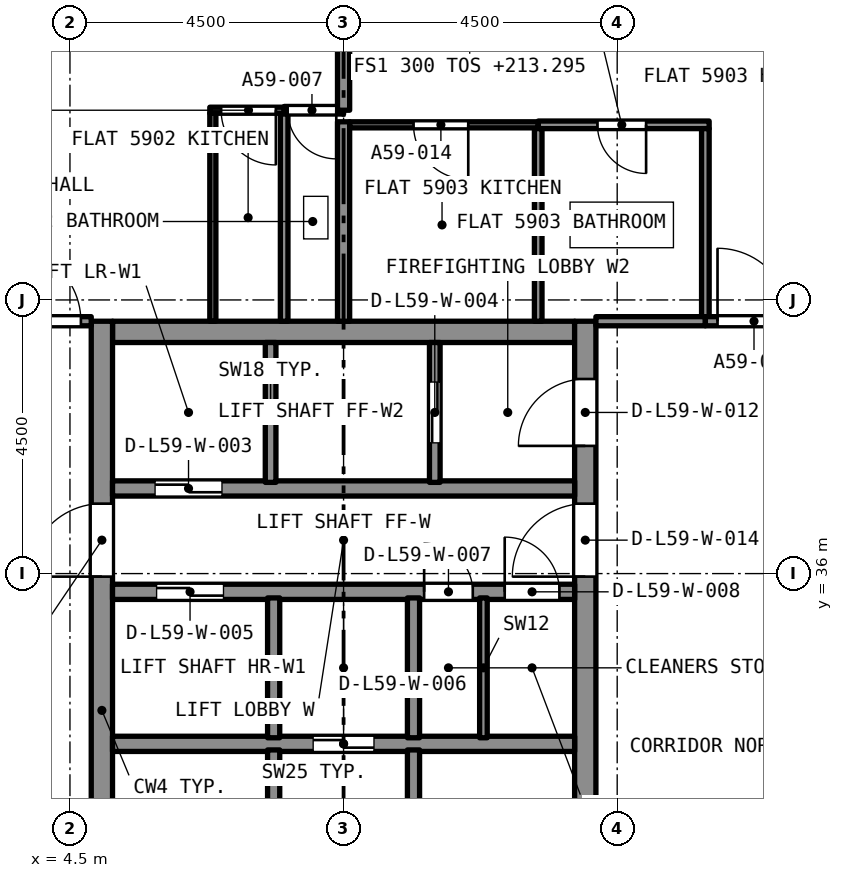
"""IFC4 building model, lengths in metres.
Left out: names, types, materials, properties, quantities, classifications, styles, units other than length and angle.
Written with IfcOpenShell. Run it as: python <this file> out.ifc"""

import sys

from ifc_helpers import new_model, si_unit, direction, frame, frame_2d, origin, place, context, subcontext, project, spatial, rectangle, extrude, element, fill, save


model = new_model("IFC4")
c1 = context("Model", 3, precision=1e-05, world=origin(), true_north=direction((0.0, 1.0)))
c2 = subcontext(c1, "Body", "Model", "MODEL_VIEW")
j1 = project(units=[si_unit("LENGTHUNIT", "METRE"), si_unit("PLANEANGLEUNIT", "RADIAN")], contexts=[c1])
p1 = place(None, origin())
s1 = spatial("IfcSite", under=j1, at=p1, CompositionType="ELEMENT")
p2 = place(p1, origin())
s2 = spatial("IfcBuilding", under=s1, at=p2, CompositionType="ELEMENT")
p3 = place(p2, frame((0.0, 0.0, 213.295)))
s3 = spatial("IfcBuildingStorey", under=s2, at=p3, CompositionType="ELEMENT", Elevation=213.295)
p4 = place(p3, frame((5.2, 39.975, 0.0), z_axis=(0.0, 0.0, 1.0), x_axis=(1.0, 0.0, 0.0)))
e1 = element("IfcWall", 1, at=p4, inside=s3, PredefinedType="SOLIDWALL", context=c2, shape_type="SweptSolid", body=[
    extrude(rectangle(XDim=7.6, YDim=0.35, at=frame_2d((3.8, 0.0))), origin(), (0.0, 0.0, 1.0), 3.2),
])
p5 = place(p3, frame((5.025, 27.35, 0.0), z_axis=(0.0, 0.0, 1.0), x_axis=(0.0, 1.0, 0.0)))
e2 = element("IfcWall", 2, at=p5, inside=s3, PredefinedType="SOLIDWALL", context=c2, shape_type="SweptSolid", body=[
    extrude(rectangle(XDim=12.8, YDim=0.35, at=frame_2d((6.4, 0.0))), origin(), (0.0, 0.0, 1.0), 3.2),
])
p6 = place(p5, frame((8.6, 0.0, 0.0)))
e3 = element("IfcOpeningElement", 3, at=p6, cuts=e2, PredefinedType="OPENING", context=c2, shape_type="SweptSolid", body=[
    extrude(rectangle(XDim=1.2, YDim=2.1, at=frame_2d((0.6, 1.05))), frame((0.0, 0.185, 0.0), z_axis=(0.0, -1.0, 0.0), x_axis=(1.0, 0.0, 0.0)), (0.0, 0.0, 1.0), 0.37),
])
p7 = place(p3, frame((12.975, 27.35, 0.0), z_axis=(0.0, 0.0, 1.0), x_axis=(0.0, 1.0, 0.0)))
e4 = element("IfcWall", 4, at=p7, inside=s3, PredefinedType="SOLIDWALL", context=c2, shape_type="SweptSolid", body=[
    extrude(rectangle(XDim=12.8, YDim=0.35, at=frame_2d((6.4, 0.0))), origin(), (0.0, 0.0, 1.0), 3.2),
])
p8 = place(p7, frame((10.75, 0.0, 0.0)))
e5 = element("IfcOpeningElement", 5, at=p8, cuts=e4, PredefinedType="OPENING", context=c2, shape_type="SweptSolid", body=[
    extrude(rectangle(XDim=1.1, YDim=2.1, at=frame_2d((0.55, 1.05))), frame((0.0, 0.185, 0.0), z_axis=(0.0, -1.0, 0.0), x_axis=(1.0, 0.0, 0.0)), (0.0, 0.0, 1.0), 0.37),
])
p9 = place(p7, frame((8.6, 0.0, 0.0)))
e6 = element("IfcOpeningElement", 6, at=p9, cuts=e4, PredefinedType="OPENING", context=c2, shape_type="SweptSolid", body=[
    extrude(rectangle(XDim=1.2, YDim=2.1, at=frame_2d((0.6, 1.05))), frame((0.0, 0.185, 0.0), z_axis=(0.0, -1.0, 0.0), x_axis=(1.0, 0.0, 0.0)), (0.0, 0.0, 1.0), 0.37),
])
p10 = place(p3, frame((9.0, 43.62, 0.0), z_axis=(0.0, 0.0, 1.0), x_axis=(-1.0, 0.0, 0.0)))
e7 = element("IfcWall", 7, at=p10, inside=s3, PredefinedType="PARTITIONING", context=c2, shape_type="SweptSolid", body=[
    extrude(rectangle(XDim=0.977, YDim=0.125, at=frame_2d((0.489, 0.0))), origin(), (0.0, 0.0, 1.0), 2.9),
])
p11 = place(p10, frame((0.12, 0.0, 0.0)))
e8 = element("IfcOpeningElement", 8, at=p11, cuts=e7, PredefinedType="OPENING", context=c2, shape_type="SweptSolid", body=[
    extrude(rectangle(XDim=0.8, YDim=2.1, at=frame_2d((0.4, 1.05))), frame((0.0, 0.073, 0.0), z_axis=(0.0, -1.0, 0.0), x_axis=(1.0, 0.0, 0.0)), (0.0, 0.0, 1.0), 0.145),
])
p12 = place(p3, frame((8.023, 40.15, 0.0), z_axis=(0.0, 0.0, 1.0), x_axis=(0.0, 1.0, 0.0)))
e9 = element("IfcWall", 9, at=p12, inside=s3, PredefinedType="PARTITIONING", context=c2, shape_type="SweptSolid", body=[
    extrude(rectangle(XDim=3.408, YDim=0.125, at=frame_2d((1.704, 0.0))), origin(), (0.0, 0.0, 1.0), 2.9),
])
p13 = place(p3, frame((9.0, 40.15, 0.0), z_axis=(0.0, 0.0, 1.0), x_axis=(0.0, 1.0, 0.0)))
e10 = element("IfcWall", 10, at=p13, inside=s3, PredefinedType="PARTITIONING", context=c2, shape_type="SweptSolid", body=[
    extrude(rectangle(XDim=3.28, YDim=0.2, at=frame_2d((1.64, 0.0))), origin(), (0.0, 0.0, 1.0), 2.9),
])
p14 = place(p3, frame((8.023, 43.62, 0.0), z_axis=(0.0, 0.0, 1.0), x_axis=(-1.0, 0.0, 0.0)))
e11 = element("IfcWall", 11, at=p14, inside=s3, PredefinedType="PARTITIONING", context=c2, shape_type="SweptSolid", body=[
    extrude(rectangle(XDim=1.223, YDim=0.1, at=frame_2d((0.611, 0.0))), origin(), (0.0, 0.0, 1.0), 2.9),
])
p15 = place(p14, frame((0.136, 0.0, 0.0)))
e12 = element("IfcOpeningElement", 12, at=p15, cuts=e11, PredefinedType="OPENING", context=c2, shape_type="SweptSolid", body=[
    extrude(rectangle(XDim=0.9, YDim=2.1, at=frame_2d((0.45, 1.05))), frame((0.0, 0.06, 0.0), z_axis=(0.0, -1.0, 0.0), x_axis=(1.0, 0.0, 0.0)), (0.0, 0.0, 1.0), 0.12),
])
p16 = place(p3, frame((6.85, 40.15, 0.0), z_axis=(0.0, 0.0, 1.0), x_axis=(0.0, 1.0, 0.0)))
e13 = element("IfcWall", 13, at=p16, inside=s3, PredefinedType="PARTITIONING", context=c2, shape_type="SweptSolid", body=[
    extrude(rectangle(XDim=3.42, YDim=0.1, at=frame_2d((1.71, 0.0))), origin(), (0.0, 0.0, 1.0), 2.9),
])
p17 = place(p3, frame((9.0, 43.62, 0.0), z_axis=(0.0, 0.0, 1.0), x_axis=(0.0, 1.0, 0.0)))
e14 = element("IfcWall", 14, at=p17, inside=s3, PredefinedType="PARTITIONING", context=c2, shape_type="SweptSolid", body=[
    extrude(rectangle(XDim=1.23, YDim=0.2, at=frame_2d((0.615, 0.0))), origin(), (0.0, 0.0, 1.0), 2.9),
])
p18 = place(p3, frame((3.35, 40.15, 0.0), z_axis=(0.0, 0.0, 1.0), x_axis=(1.0, 0.0, 0.0)))
e15 = element("IfcWall", 15, at=p18, inside=s3, PredefinedType="PARTITIONING", context=c2, shape_type="SweptSolid", body=[
    extrude(rectangle(XDim=1.5, YDim=0.15, at=frame_2d((0.75, 0.0))), origin(), (0.0, 0.0, 1.0), 2.9),
])
p19 = place(p18, frame((0.13, 0.0, 0.0)))
e16 = element("IfcOpeningElement", 16, at=p19, cuts=e15, PredefinedType="OPENING", context=c2, shape_type="SweptSolid", body=[
    extrude(rectangle(XDim=1.2, YDim=2.4, at=frame_2d((0.6, 1.2))), frame((0.0, 0.085, 0.0), z_axis=(0.0, -1.0, 0.0), x_axis=(1.0, 0.0, 0.0)), (0.0, 0.0, 1.0), 0.17),
])
p20 = place(p3, frame((15.012, 43.38, 0.0), z_axis=(0.0, 0.0, 1.0), x_axis=(-1.0, 0.0, 0.0)))
e17 = element("IfcWall", 17, at=p20, inside=s3, PredefinedType="PARTITIONING", context=c2, shape_type="SweptSolid", body=[
    extrude(rectangle(XDim=2.812, YDim=0.125, at=frame_2d((1.406, 0.0))), origin(), (0.0, 0.0, 1.0), 2.9),
])
p21 = place(p20, frame((1.037, 0.0, 0.0)))
e18 = element("IfcOpeningElement", 18, at=p21, cuts=e17, PredefinedType="OPENING", context=c2, shape_type="SweptSolid", body=[
    extrude(rectangle(XDim=0.8, YDim=2.1, at=frame_2d((0.4, 1.05))), frame((0.0, 0.073, 0.0), z_axis=(0.0, -1.0, 0.0), x_axis=(1.0, 0.0, 0.0)), (0.0, 0.0, 1.0), 0.145),
])
p22 = place(p3, frame((14.95, 40.225, 0.0), z_axis=(0.0, 0.0, 1.0), x_axis=(0.0, 1.0, 0.0)))
e19 = element("IfcWall", 19, at=p22, inside=s3, PredefinedType="PARTITIONING", context=c2, shape_type="SweptSolid", body=[
    extrude(rectangle(XDim=3.092, YDim=0.125, at=frame_2d((1.546, 0.0))), origin(), (0.0, 0.0, 1.0), 2.9),
])
p23 = place(p3, frame((12.201, 40.15, 0.0), z_axis=(0.0, 0.0, 1.0), x_axis=(0.0, 1.0, 0.0)))
e20 = element("IfcWall", 20, at=p23, inside=s3, PredefinedType="PARTITIONING", context=c2, shape_type="SweptSolid", body=[
    extrude(rectangle(XDim=3.167, YDim=0.125, at=frame_2d((1.584, 0.0))), origin(), (0.0, 0.0, 1.0), 2.9),
])
p24 = place(p3, frame((13.15, 40.15, 0.0), z_axis=(0.0, 0.0, 1.0), x_axis=(1.0, 0.0, 0.0)))
e21 = element("IfcWall", 21, at=p24, inside=s3, PredefinedType="PARTITIONING", context=c2, shape_type="SweptSolid", body=[
    extrude(rectangle(XDim=1.8, YDim=0.15, at=frame_2d((0.9, 0.0))), origin(), (0.0, 0.0, 1.0), 2.9),
])
p25 = place(p3, frame((12.201, 43.38, 0.0), z_axis=(0.0, 0.0, 1.0), x_axis=(-1.0, 0.0, 0.0)))
e22 = element("IfcWall", 22, at=p25, inside=s3, PredefinedType="PARTITIONING", context=c2, shape_type="SweptSolid", body=[
    extrude(rectangle(XDim=3.101, YDim=0.1, at=frame_2d((1.55, 0.0))), origin(), (0.0, 0.0, 1.0), 2.9),
])
p26 = place(p25, frame((1.15, 0.0, 0.0)))
e23 = element("IfcOpeningElement", 23, at=p26, cuts=e22, PredefinedType="OPENING", context=c2, shape_type="SweptSolid", body=[
    extrude(rectangle(XDim=0.9, YDim=2.1, at=frame_2d((0.45, 1.05))), frame((0.0, 0.06, 0.0), z_axis=(0.0, -1.0, 0.0), x_axis=(1.0, 0.0, 0.0)), (0.0, 0.0, 1.0), 0.12),
])
p27 = place(p3, frame((14.95, 40.15, 0.0), z_axis=(0.0, 0.0, 1.0), x_axis=(1.0, 0.0, 0.0)))
e24 = element("IfcWall", 24, at=p27, inside=s3, PredefinedType="PARTITIONING", context=c2, shape_type="SweptSolid", body=[
    extrude(rectangle(XDim=2.65, YDim=0.15, at=frame_2d((1.325, 0.0))), origin(), (0.0, 0.0, 1.0), 2.9),
])
p28 = place(p27, frame((0.2, 0.0, 0.0)))
e25 = element("IfcOpeningElement", 25, at=p28, cuts=e24, PredefinedType="OPENING", context=c2, shape_type="SweptSolid", body=[
    extrude(rectangle(XDim=1.2, YDim=2.4, at=frame_2d((0.6, 1.2))), frame((0.0, 0.085, 0.0), z_axis=(0.0, -1.0, 0.0), x_axis=(1.0, 0.0, 0.0)), (0.0, 0.0, 1.0), 0.17),
])
p29 = place(p3, frame((5.2, 33.2, 0.0), z_axis=(0.0, 0.0, 1.0), x_axis=(1.0, 0.0, 0.0)))
e26 = element("IfcWall", 26, at=p29, inside=s3, PredefinedType="SOLIDWALL", context=c2, shape_type="SweptSolid", body=[
    extrude(rectangle(XDim=7.6, YDim=0.25, at=frame_2d((3.8, 0.0))), origin(), (0.0, 0.0, 1.0), 2.9),
])
p30 = place(p29, frame((3.3, 0.0, 0.0)))
e27 = element("IfcOpeningElement", 27, at=p30, cuts=e26, PredefinedType="OPENING", context=c2, shape_type="SweptSolid", body=[
    extrude(rectangle(XDim=1.0, YDim=2.1, at=frame_2d((0.5, 1.05))), frame((0.0, 0.135, 0.0), z_axis=(0.0, -1.0, 0.0), x_axis=(1.0, 0.0, 0.0)), (0.0, 0.0, 1.0), 0.27),
])
p31 = place(p3, frame((5.2, 35.7, 0.0), z_axis=(0.0, 0.0, 1.0), x_axis=(1.0, 0.0, 0.0)))
e28 = element("IfcWall", 28, at=p31, inside=s3, PredefinedType="SOLIDWALL", context=c2, shape_type="SweptSolid", body=[
    extrude(rectangle(XDim=7.6, YDim=0.25, at=frame_2d((3.8, 0.0))), origin(), (0.0, 0.0, 1.0), 2.9),
])
p32 = place(p31, frame((0.725, 0.0, 0.0)))
e29 = element("IfcOpeningElement", 29, at=p32, cuts=e28, PredefinedType="OPENING", context=c2, shape_type="SweptSolid", body=[
    extrude(rectangle(XDim=1.1, YDim=2.4, at=frame_2d((0.55, 1.2))), frame((0.0, 0.135, 0.0), z_axis=(0.0, -1.0, 0.0), x_axis=(1.0, 0.0, 0.0)), (0.0, 0.0, 1.0), 0.27),
])
p33 = place(p31, frame((5.125, 0.0, 0.0)))
e30 = element("IfcOpeningElement", 30, at=p33, cuts=e28, PredefinedType="OPENING", context=c2, shape_type="SweptSolid", body=[
    extrude(rectangle(XDim=0.8, YDim=2.1, at=frame_2d((0.4, 1.05))), frame((0.0, 0.135, 0.0), z_axis=(0.0, -1.0, 0.0), x_axis=(1.0, 0.0, 0.0)), (0.0, 0.0, 1.0), 0.27),
])
p34 = place(p31, frame((6.45, 0.0, 0.0)))
e31 = element("IfcOpeningElement", 31, at=p34, cuts=e28, PredefinedType="OPENING", context=c2, shape_type="SweptSolid", body=[
    extrude(rectangle(XDim=0.9, YDim=2.1, at=frame_2d((0.45, 1.05))), frame((0.0, 0.135, 0.0), z_axis=(0.0, -1.0, 0.0), x_axis=(1.0, 0.0, 0.0)), (0.0, 0.0, 1.0), 0.27),
])
p35 = place(p3, frame((5.2, 37.4, 0.0), z_axis=(0.0, 0.0, 1.0), x_axis=(1.0, 0.0, 0.0)))
e32 = element("IfcWall", 32, at=p35, inside=s3, PredefinedType="SOLIDWALL", context=c2, shape_type="SweptSolid", body=[
    extrude(rectangle(XDim=7.6, YDim=0.25, at=frame_2d((3.8, 0.0))), origin(), (0.0, 0.0, 1.0), 2.9),
])
p36 = place(p35, frame((0.7, 0.0, 0.0)))
e33 = element("IfcOpeningElement", 33, at=p36, cuts=e32, PredefinedType="OPENING", context=c2, shape_type="SweptSolid", body=[
    extrude(rectangle(XDim=1.1, YDim=2.4, at=frame_2d((0.55, 1.2))), frame((0.0, 0.135, 0.0), z_axis=(0.0, -1.0, 0.0), x_axis=(1.0, 0.0, 0.0)), (0.0, 0.0, 1.0), 0.27),
])
p37 = place(p3, frame((7.85, 27.7, 0.0), z_axis=(0.0, 0.0, 1.0), x_axis=(0.0, 1.0, 0.0)))
e34 = element("IfcWall", 34, at=p37, inside=s3, PredefinedType="SOLIDWALL", context=c2, shape_type="SweptSolid", body=[
    extrude(rectangle(XDim=5.4, YDim=0.2, at=frame_2d((2.7, 0.0))), origin(), (0.0, 0.0, 1.0), 2.9),
])
p38 = place(p37, frame((0.2, 0.0, 0.0)))
e35 = element("IfcOpeningElement", 35, at=p38, cuts=e34, PredefinedType="OPENING", context=c2, shape_type="SweptSolid", body=[
    extrude(rectangle(XDim=0.9, YDim=2.1, at=frame_2d((0.45, 1.05))), frame((0.0, 0.11, 0.0), z_axis=(0.0, -1.0, 0.0), x_axis=(1.0, 0.0, 0.0)), (0.0, 0.0, 1.0), 0.22),
])
p39 = place(p3, frame((10.15, 27.7, 0.0), z_axis=(0.0, 0.0, 1.0), x_axis=(0.0, 1.0, 0.0)))
e36 = element("IfcWall", 36, at=p39, inside=s3, PredefinedType="SOLIDWALL", context=c2, shape_type="SweptSolid", body=[
    extrude(rectangle(XDim=5.4, YDim=0.2, at=frame_2d((2.7, 0.0))), origin(), (0.0, 0.0, 1.0), 2.9),
])
p40 = place(p39, frame((0.2, 0.0, 0.0)))
e37 = element("IfcOpeningElement", 37, at=p40, cuts=e36, PredefinedType="OPENING", context=c2, shape_type="SweptSolid", body=[
    extrude(rectangle(XDim=0.9, YDim=2.1, at=frame_2d((0.45, 1.05))), frame((0.0, 0.11, 0.0), z_axis=(0.0, -1.0, 0.0), x_axis=(1.0, 0.0, 0.0)), (0.0, 0.0, 1.0), 0.22),
])
for number, where, z_axis, x_axis in (
    (38, (7.85, 33.3, 0.0), (0.0, 0.0, 1.0), (0.0, 1.0, 0.0)),
    (39, (10.15, 33.3, 0.0), (0.0, 0.0, 1.0), (0.0, 1.0, 0.0)),
):
    element("IfcWall", number, at=place(p3, frame(where, z_axis=z_axis, x_axis=x_axis)), inside=s3, PredefinedType="SOLIDWALL", context=c2, shape_type="SweptSolid", body=[
        extrude(rectangle(XDim=2.3, YDim=0.2, at=frame_2d((1.15, 0.0))), origin(), (0.0, 0.0, 1.0), 2.9),
    ])
p41 = place(p3, frame((7.8, 37.5, 0.0), z_axis=(0.0, 0.0, 1.0), x_axis=(0.0, 1.0, 0.0)))
e40 = element("IfcWall", 40, at=p41, inside=s3, PredefinedType="SOLIDWALL", context=c2, shape_type="SweptSolid", body=[
    extrude(rectangle(XDim=2.3, YDim=0.175, at=frame_2d((1.15, 0.0))), origin(), (0.0, 0.0, 1.0), 2.9),
])
p42 = place(p3, frame((10.5, 37.5, 0.0), z_axis=(0.0, 0.0, 1.0), x_axis=(0.0, 1.0, 0.0)))
e41 = element("IfcWall", 41, at=p42, inside=s3, PredefinedType="SOLIDWALL", context=c2, shape_type="SweptSolid", body=[
    extrude(rectangle(XDim=2.3, YDim=0.175, at=frame_2d((1.15, 0.0))), origin(), (0.0, 0.0, 1.0), 2.9),
])
p43 = place(p42, frame((0.65, 0.0, 0.0)))
e42 = element("IfcOpeningElement", 42, at=p43, cuts=e41, PredefinedType="OPENING", context=c2, shape_type="SweptSolid", body=[
    extrude(rectangle(XDim=1.0, YDim=2.1, at=frame_2d((0.5, 1.05))), frame((0.0, 0.097, 0.0), z_axis=(0.0, -1.0, 0.0), x_axis=(1.0, 0.0, 0.0)), (0.0, 0.0, 1.0), 0.195),
])
p44 = place(p3, frame((11.3, 33.3, 0.0), z_axis=(0.0, 0.0, 1.0), x_axis=(0.0, 1.0, 0.0)))
e43 = element("IfcWall", 43, at=p44, inside=s3, PredefinedType="PARTITIONING", context=c2, shape_type="SweptSolid", body=[
    extrude(rectangle(XDim=2.3, YDim=0.125, at=frame_2d((1.15, 0.0))), origin(), (0.0, 0.0, 1.0), 2.9),
])
p45 = place(p11, origin())
e44 = element("IfcDoor", 44, at=p45, inside=s3, OperationType="SINGLE_SWING_LEFT", PredefinedType="DOOR", context=c2, shape_type="SweptSolid", body=[
    extrude(rectangle(XDim=0.8, YDim=2.1, at=frame_2d((0.4, 1.05))), frame((0.0, 0.025, 0.0), z_axis=(0.0, -1.0, 0.0), x_axis=(1.0, 0.0, 0.0)), (0.0, 0.0, 1.0), 0.05),
])
fill(e8, e44)
p46 = place(p15, origin())
e45 = element("IfcDoor", 45, at=p46, inside=s3, OperationType="SINGLE_SWING_LEFT", PredefinedType="DOOR", context=c2, shape_type="SweptSolid", body=[
    extrude(rectangle(XDim=0.9, YDim=2.1, at=frame_2d((0.45, 1.05))), frame((0.0, 0.025, 0.0), z_axis=(0.0, -1.0, 0.0), x_axis=(1.0, 0.0, 0.0)), (0.0, 0.0, 1.0), 0.05),
])
fill(e12, e45)
p47 = place(p19, origin())
e46 = element("IfcDoor", 46, at=p47, inside=s3, OperationType="SINGLE_SWING_LEFT", PredefinedType="DOOR", context=c2, shape_type="SweptSolid", body=[
    extrude(rectangle(XDim=1.2, YDim=2.4, at=frame_2d((0.6, 1.2))), frame((0.0, 0.025, 0.0), z_axis=(0.0, -1.0, 0.0), x_axis=(1.0, 0.0, 0.0)), (0.0, 0.0, 1.0), 0.05),
])
fill(e16, e46)
p48 = place(p21, origin())
e47 = element("IfcDoor", 47, at=p48, inside=s3, OperationType="SINGLE_SWING_RIGHT", PredefinedType="DOOR", context=c2, shape_type="SweptSolid", body=[
    extrude(rectangle(XDim=0.8, YDim=2.1, at=frame_2d((0.4, 1.05))), frame((0.0, 0.025, 0.0), z_axis=(0.0, -1.0, 0.0), x_axis=(1.0, 0.0, 0.0)), (0.0, 0.0, 1.0), 0.05),
])
fill(e18, e47)
p49 = place(p26, origin())
e48 = element("IfcDoor", 48, at=p49, inside=s3, OperationType="SINGLE_SWING_RIGHT", PredefinedType="DOOR", context=c2, shape_type="SweptSolid", body=[
    extrude(rectangle(XDim=0.9, YDim=2.1, at=frame_2d((0.45, 1.05))), frame((0.0, 0.025, 0.0), z_axis=(0.0, -1.0, 0.0), x_axis=(1.0, 0.0, 0.0)), (0.0, 0.0, 1.0), 0.05),
])
fill(e23, e48)
p50 = place(p28, origin())
e49 = element("IfcDoor", 49, at=p50, inside=s3, OperationType="SINGLE_SWING_LEFT", PredefinedType="DOOR", context=c2, shape_type="SweptSolid", body=[
    extrude(rectangle(XDim=1.2, YDim=2.4, at=frame_2d((0.6, 1.2))), frame((0.0, 0.025, 0.0), z_axis=(0.0, -1.0, 0.0), x_axis=(1.0, 0.0, 0.0)), (0.0, 0.0, 1.0), 0.05),
])
fill(e25, e49)
p51 = place(p36, origin())
e50 = element("IfcDoor", 50, at=p51, inside=s3, OperationType="SLIDING_TO_LEFT", PredefinedType="DOOR", context=c2, shape_type="SweptSolid", body=[
    extrude(rectangle(XDim=1.1, YDim=2.4, at=frame_2d((0.55, 1.2))), frame((0.0, 0.025, 0.0), z_axis=(0.0, -1.0, 0.0), x_axis=(1.0, 0.0, 0.0)), (0.0, 0.0, 1.0), 0.05),
])
fill(e33, e50)
p52 = place(p43, origin())
e51 = element("IfcDoor", 51, at=p52, inside=s3, OperationType="SLIDING_TO_LEFT", PredefinedType="DOOR", context=c2, shape_type="SweptSolid", body=[
    extrude(rectangle(XDim=1.0, YDim=2.1, at=frame_2d((0.5, 1.05))), frame((0.0, 0.025, 0.0), z_axis=(0.0, -1.0, 0.0), x_axis=(1.0, 0.0, 0.0)), (0.0, 0.0, 1.0), 0.05),
])
fill(e42, e51)
p53 = place(p32, origin())
e52 = element("IfcDoor", 52, at=p53, inside=s3, OperationType="SLIDING_TO_LEFT", PredefinedType="DOOR", context=c2, shape_type="SweptSolid", body=[
    extrude(rectangle(XDim=1.1, YDim=2.4, at=frame_2d((0.55, 1.2))), frame((0.0, 0.025, 0.0), z_axis=(0.0, -1.0, 0.0), x_axis=(1.0, 0.0, 0.0)), (0.0, 0.0, 1.0), 0.05),
])
fill(e29, e52)
p54 = place(p30, origin())
e53 = element("IfcDoor", 53, at=p54, inside=s3, OperationType="SLIDING_TO_LEFT", PredefinedType="DOOR", context=c2, shape_type="SweptSolid", body=[
    extrude(rectangle(XDim=1.0, YDim=2.1, at=frame_2d((0.5, 1.05))), frame((0.0, 0.025, 0.0), z_axis=(0.0, -1.0, 0.0), x_axis=(1.0, 0.0, 0.0)), (0.0, 0.0, 1.0), 0.05),
])
fill(e27, e53)
p55 = place(p33, origin())
e54 = element("IfcDoor", 54, at=p55, inside=s3, OperationType="SINGLE_SWING_LEFT", PredefinedType="DOOR", context=c2, shape_type="SweptSolid", body=[
    extrude(rectangle(XDim=0.8, YDim=2.1, at=frame_2d((0.4, 1.05))), frame((0.0, 0.025, 0.0), z_axis=(0.0, -1.0, 0.0), x_axis=(1.0, 0.0, 0.0)), (0.0, 0.0, 1.0), 0.05),
])
fill(e30, e54)
p56 = place(p34, origin())
e55 = element("IfcDoor", 55, at=p56, inside=s3, OperationType="SINGLE_SWING_LEFT", PredefinedType="DOOR", context=c2, shape_type="SweptSolid", body=[
    extrude(rectangle(XDim=0.9, YDim=2.1, at=frame_2d((0.45, 1.05))), frame((0.0, 0.025, 0.0), z_axis=(0.0, -1.0, 0.0), x_axis=(1.0, 0.0, 0.0)), (0.0, 0.0, 1.0), 0.05),
])
fill(e31, e55)
p57 = place(p8, origin())
e56 = element("IfcDoor", 56, at=p57, inside=s3, OperationType="SINGLE_SWING_LEFT", PredefinedType="DOOR", context=c2, shape_type="SweptSolid", body=[
    extrude(rectangle(XDim=1.1, YDim=2.1, at=frame_2d((0.55, 1.05))), frame((0.0, 0.025, 0.0), z_axis=(0.0, -1.0, 0.0), x_axis=(1.0, 0.0, 0.0)), (0.0, 0.0, 1.0), 0.05),
])
fill(e5, e56)
p58 = place(p6, origin())
e57 = element("IfcDoor", 57, at=p58, inside=s3, OperationType="SINGLE_SWING_LEFT", PredefinedType="DOOR", context=c2, shape_type="SweptSolid", body=[
    extrude(rectangle(XDim=1.2, YDim=2.1, at=frame_2d((0.6, 1.05))), frame((0.0, 0.025, 0.0), z_axis=(0.0, -1.0, 0.0), x_axis=(1.0, 0.0, 0.0)), (0.0, 0.0, 1.0), 0.05),
])
fill(e3, e57)
p59 = place(p9, origin())
e58 = element("IfcDoor", 58, at=p59, inside=s3, OperationType="SINGLE_SWING_LEFT", PredefinedType="DOOR", context=c2, shape_type="SweptSolid", body=[
    extrude(rectangle(XDim=1.2, YDim=2.1, at=frame_2d((0.6, 1.05))), frame((0.0, 0.025, 0.0), z_axis=(0.0, -1.0, 0.0), x_axis=(1.0, 0.0, 0.0)), (0.0, 0.0, 1.0), 0.05),
])
fill(e6, e58)
save(model, sys.argv[1])
